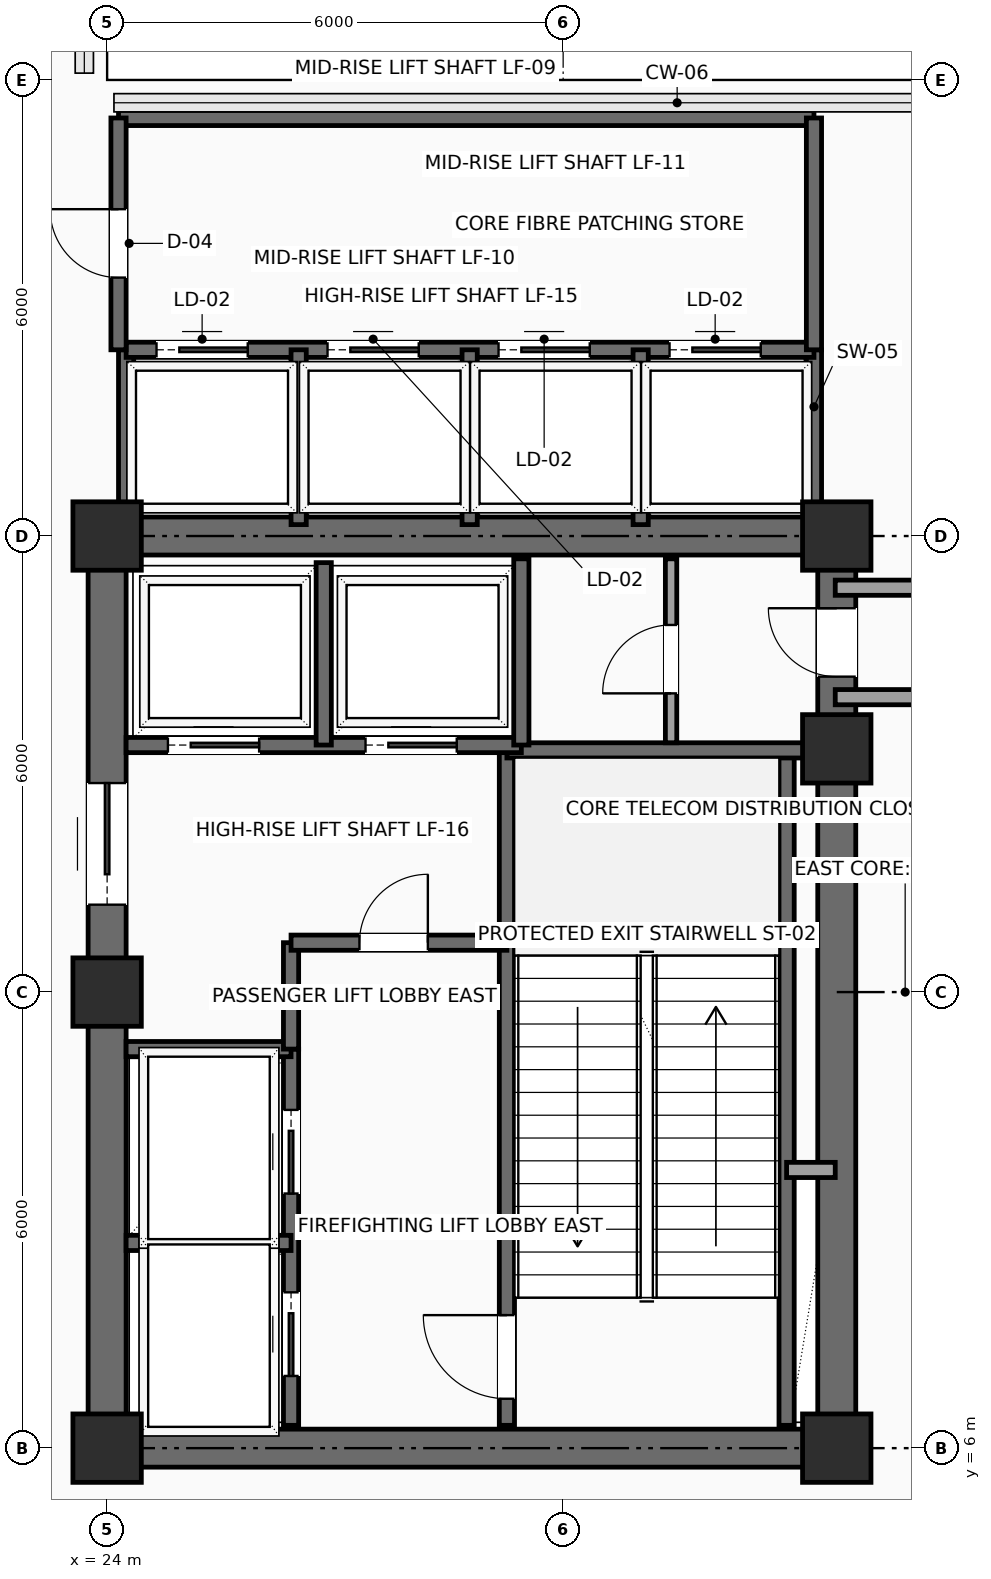
"""IFC4 building model, lengths in metres.
Left out: names, types, materials, properties, quantities, classifications, styles, units other than length and angle.
Written with IfcOpenShell. Run it as: python <this file> out.ifc"""

import sys

from ifc_helpers import new_model, si_unit, direction, frame, frame_2d, origin, origin_2d, place, context, subcontext, project, spatial, rectangle, extrude, element, fill, save


model = new_model("IFC4")
c1 = context("Model", 3, precision=1e-05, world=origin(), true_north=direction((0.0, 1.0)))
c2 = subcontext(c1, "Body", "Model", "MODEL_VIEW")
j1 = project(units=[si_unit("LENGTHUNIT", "METRE"), si_unit("PLANEANGLEUNIT", "RADIAN")], contexts=[c1])
p1 = place(None, origin())
s1 = spatial("IfcSite", under=j1, at=p1, CompositionType="ELEMENT")
p2 = place(p1, origin())
s2 = spatial("IfcBuilding", under=s1, at=p2, CompositionType="ELEMENT")
p3 = place(p2, frame((0.0, 0.0, 199.2)))
s3 = spatial("IfcBuildingStorey", under=s2, at=p3, CompositionType="ELEMENT", Elevation=199.2)
for number, where, z_axis, x_axis in (
    (1, (24.0, 6.0, 0.0), (0.0, 0.0, 1.0), (1.0, 0.0, 0.0)),
    (2, (24.0, 12.0, 0.0), (0.0, 0.0, 1.0), (1.0, 0.0, 0.0)),
    (3, (24.0, 18.0, 0.0), (0.0, 0.0, 1.0), (1.0, 0.0, 0.0)),
    (4, (33.6, 6.0, 0.0), (0.0, 0.0, 1.0), (1.0, 0.0, 0.0)),
    (5, (33.6, 15.2, 0.0), (0.0, 0.0, 1.0), (1.0, 0.0, 0.0)),
    (6, (33.6, 18.0, 0.0), (0.0, 0.0, 1.0), (1.0, 0.0, 0.0)),
):
    element("IfcColumn", number, at=place(p3, frame(where, z_axis=z_axis, x_axis=x_axis)), inside=s3, PredefinedType="COLUMN", context=c2, shape_type="SweptSolid", body=[
        extrude(rectangle(XDim=0.9, YDim=0.9, at=origin_2d()), origin(), (0.0, 0.0, 1.0), 4.8),
    ])
for number, where, z_axis, x_axis in (
    (7, (24.0, 6.0, 0.0), (0.0, 0.0, 1.0), (1.0, 0.0, 0.0)),
    (8, (24.0, 18.0, 0.0), (0.0, 0.0, 1.0), (1.0, 0.0, 0.0)),
):
    element("IfcWall", number, at=place(p3, frame(where, z_axis=z_axis, x_axis=x_axis)), inside=s3, PredefinedType="SHEAR", context=c2, shape_type="SweptSolid", body=[
        extrude(rectangle(XDim=9.6, YDim=0.5, at=frame_2d((4.8, 0.0))), origin(), (0.0, 0.0, 1.0), 4.5),
    ])
p4 = place(p3, frame((24.0, 6.0, 0.0), z_axis=(0.0, 0.0, 1.0), x_axis=(0.0, 1.0, 0.0)))
e9 = element("IfcWall", 9, at=p4, inside=s3, PredefinedType="SHEAR", context=c2, shape_type="SweptSolid", body=[
    extrude(rectangle(XDim=12.0, YDim=0.5, at=frame_2d((6.0, 0.0))), origin(), (0.0, 0.0, 1.0), 4.5),
])
p5 = place(p4, frame((7.15, 0.0, 0.0)))
e10 = element("IfcOpeningElement", 10, at=p5, cuts=e9, PredefinedType="OPENING", context=c2, shape_type="SweptSolid", body=[
    extrude(rectangle(XDim=1.6, YDim=2.3, at=frame_2d((0.8, 1.15))), frame((0.0, 0.26, 0.0), z_axis=(0.0, -1.0, 0.0), x_axis=(1.0, 0.0, 0.0)), (0.0, 0.0, 1.0), 0.52),
])
p6 = place(p3, frame((33.6, 6.0, 0.0), z_axis=(0.0, 0.0, 1.0), x_axis=(0.0, 1.0, 0.0)))
e11 = element("IfcWall", 11, at=p6, inside=s3, PredefinedType="SHEAR", context=c2, shape_type="SweptSolid", body=[
    extrude(rectangle(XDim=12.0, YDim=0.5, at=frame_2d((6.0, 0.0))), origin(), (0.0, 0.0, 1.0), 4.5),
])
p7 = place(p6, frame((10.15, 0.0, 0.0)))
e12 = element("IfcOpeningElement", 12, at=p7, cuts=e11, PredefinedType="OPENING", context=c2, shape_type="SweptSolid", body=[
    extrude(rectangle(XDim=0.9, YDim=2.15, at=frame_2d((0.45, 1.075))), frame((0.0, 0.26, 0.0), z_axis=(0.0, -1.0, 0.0), x_axis=(1.0, 0.0, 0.0)), (0.0, 0.0, 1.0), 0.52),
])
p8 = place(p3, frame((29.26, 6.3, 0.0), z_axis=(0.0, 0.0, 1.0), x_axis=(0.0, 1.0, 0.0)))
e13 = element("IfcWall", 13, at=p8, inside=s3, PredefinedType="SHEAR", context=c2, shape_type="SweptSolid", body=[
    extrude(rectangle(XDim=8.88, YDim=0.2, at=frame_2d((4.44, 0.0))), origin(), (0.0, 0.0, 1.0), 4.5),
])
p9 = place(p8, frame((0.35, 0.0, 0.0)))
e14 = element("IfcOpeningElement", 14, at=p9, cuts=e13, PredefinedType="OPENING", context=c2, shape_type="SweptSolid", body=[
    extrude(rectangle(XDim=1.1, YDim=2.2, at=frame_2d((0.55, 1.1))), frame((0.0, 0.11, 0.0), z_axis=(0.0, -1.0, 0.0), x_axis=(1.0, 0.0, 0.0)), (0.0, 0.0, 1.0), 0.22),
])
p10 = place(p3, frame((32.94, 6.3, 0.0), z_axis=(0.0, 0.0, 1.0), x_axis=(0.0, 1.0, 0.0)))
e15 = element("IfcWall", 15, at=p10, inside=s3, PredefinedType="SHEAR", context=c2, shape_type="SweptSolid", body=[
    extrude(rectangle(XDim=8.88, YDim=0.2, at=frame_2d((4.44, 0.0))), origin(), (0.0, 0.0, 1.0), 4.5),
])
p11 = place(p3, frame((29.26, 15.18, 0.0), z_axis=(0.0, 0.0, 1.0), x_axis=(1.0, 0.0, 0.0)))
e16 = element("IfcWall", 16, at=p11, inside=s3, PredefinedType="SHEAR", context=c2, shape_type="SweptSolid", body=[
    extrude(rectangle(XDim=4.04, YDim=0.2, at=frame_2d((2.02, 0.0))), origin(), (0.0, 0.0, 1.0), 4.5),
])
p12 = place(p3, frame((26.42, 6.3, 0.0), z_axis=(0.0, 0.0, 1.0), x_axis=(0.0, 1.0, 0.0)))
e17 = element("IfcWall", 17, at=p12, inside=s3, PredefinedType="SHEAR", context=c2, shape_type="SweptSolid", body=[
    extrude(rectangle(XDim=4.95, YDim=0.2, at=frame_2d((2.475, 0.0))), origin(), (0.0, 0.0, 1.0), 4.5),
])
p13 = place(p12, frame((0.65, 0.0, 0.0)))
e18 = element("IfcOpeningElement", 18, at=p13, cuts=e17, PredefinedType="OPENING", context=c2, shape_type="SweptSolid", body=[
    extrude(rectangle(XDim=1.1, YDim=2.2, at=frame_2d((0.55, 1.1))), frame((0.0, 0.11, 0.0), z_axis=(0.0, -1.0, 0.0), x_axis=(1.0, 0.0, 0.0)), (0.0, 0.0, 1.0), 0.22),
])
p14 = place(p12, frame((3.05, 0.0, 0.0)))
e19 = element("IfcOpeningElement", 19, at=p14, cuts=e17, PredefinedType="OPENING", context=c2, shape_type="SweptSolid", body=[
    extrude(rectangle(XDim=1.1, YDim=2.2, at=frame_2d((0.55, 1.1))), frame((0.0, 0.11, 0.0), z_axis=(0.0, -1.0, 0.0), x_axis=(1.0, 0.0, 0.0)), (0.0, 0.0, 1.0), 0.22),
])
for number, where, z_axis, x_axis in (
    (20, (24.25, 8.7, 0.0), (0.0, 0.0, 1.0), (1.0, 0.0, 0.0)),
    (21, (24.25, 11.25, 0.0), (0.0, 0.0, 1.0), (1.0, 0.0, 0.0)),
):
    element("IfcWall", number, at=place(p3, frame(where, z_axis=z_axis, x_axis=x_axis)), inside=s3, PredefinedType="SHEAR", context=c2, shape_type="SweptSolid", body=[
        extrude(rectangle(XDim=2.17, YDim=0.2, at=frame_2d((1.085, 0.0))), origin(), (0.0, 0.0, 1.0), 4.5),
    ])
p15 = place(p3, frame((26.42, 11.25, 0.0), z_axis=(0.0, 0.0, 1.0), x_axis=(0.0, 1.0, 0.0)))
e22 = element("IfcWall", 22, at=p15, inside=s3, PredefinedType="SHEAR", context=c2, shape_type="SweptSolid", body=[
    extrude(rectangle(XDim=1.4, YDim=0.2, at=frame_2d((0.7, 0.0))), origin(), (0.0, 0.0, 1.0), 4.5),
])
p16 = place(p3, frame((26.42, 12.65, 0.0), z_axis=(0.0, 0.0, 1.0), x_axis=(1.0, 0.0, 0.0)))
e23 = element("IfcWall", 23, at=p16, inside=s3, PredefinedType="SHEAR", context=c2, shape_type="SweptSolid", body=[
    extrude(rectangle(XDim=2.84, YDim=0.2, at=frame_2d((1.42, 0.0))), origin(), (0.0, 0.0, 1.0), 4.5),
])
p17 = place(p16, frame((0.9, 0.0, 0.0)))
e24 = element("IfcOpeningElement", 24, at=p17, cuts=e23, PredefinedType="OPENING", context=c2, shape_type="SweptSolid", body=[
    extrude(rectangle(XDim=0.9, YDim=2.15, at=frame_2d((0.45, 1.075))), frame((0.0, 0.11, 0.0), z_axis=(0.0, -1.0, 0.0), x_axis=(1.0, 0.0, 0.0)), (0.0, 0.0, 1.0), 0.22),
])
p18 = place(p3, frame((32.94, 9.66, 0.0), z_axis=(0.0, 0.0, 1.0), x_axis=(1.0, 0.0, 0.0)))
e25 = element("IfcWall", 25, at=p18, inside=s3, PredefinedType="SOLIDWALL", context=c2, shape_type="SweptSolid", body=[
    extrude(rectangle(XDim=0.64, YDim=0.2, at=frame_2d((0.32, 0.0))), origin(), (0.0, 0.0, 1.0), 4.5),
])
p19 = place(p3, frame((24.25, 15.25, 0.0), z_axis=(0.0, 0.0, 1.0), x_axis=(1.0, 0.0, 0.0)))
e26 = element("IfcWall", 26, at=p19, inside=s3, PredefinedType="SHEAR", context=c2, shape_type="SweptSolid", body=[
    extrude(rectangle(XDim=5.2, YDim=0.2, at=frame_2d((2.6, 0.0))), origin(), (0.0, 0.0, 1.0), 4.5),
])
p20 = place(p19, frame((0.55, 0.0, 0.0)))
e27 = element("IfcOpeningElement", 27, at=p20, cuts=e26, PredefinedType="OPENING", context=c2, shape_type="SweptSolid", body=[
    extrude(rectangle(XDim=1.2, YDim=2.2, at=frame_2d((0.6, 1.1))), frame((0.0, 0.11, 0.0), z_axis=(0.0, -1.0, 0.0), x_axis=(1.0, 0.0, 0.0)), (0.0, 0.0, 1.0), 0.22),
])
p21 = place(p19, frame((3.15, 0.0, 0.0)))
e28 = element("IfcOpeningElement", 28, at=p21, cuts=e26, PredefinedType="OPENING", context=c2, shape_type="SweptSolid", body=[
    extrude(rectangle(XDim=1.2, YDim=2.2, at=frame_2d((0.6, 1.1))), frame((0.0, 0.11, 0.0), z_axis=(0.0, -1.0, 0.0), x_axis=(1.0, 0.0, 0.0)), (0.0, 0.0, 1.0), 0.22),
])
p22 = place(p3, frame((26.85, 15.25, 0.0), z_axis=(0.0, 0.0, 1.0), x_axis=(0.0, 1.0, 0.0)))
e29 = element("IfcWall", 29, at=p22, inside=s3, PredefinedType="SHEAR", context=c2, shape_type="SweptSolid", body=[
    extrude(rectangle(XDim=2.4, YDim=0.2, at=frame_2d((1.2, 0.0))), origin(), (0.0, 0.0, 1.0), 4.5),
])
p23 = place(p3, frame((29.45, 15.25, 0.0), z_axis=(0.0, 0.0, 1.0), x_axis=(0.0, 1.0, 0.0)))
e30 = element("IfcWall", 30, at=p23, inside=s3, PredefinedType="SHEAR", context=c2, shape_type="SweptSolid", body=[
    extrude(rectangle(XDim=2.45, YDim=0.2, at=frame_2d((1.225, 0.0))), origin(), (0.0, 0.0, 1.0), 4.5),
])
p24 = place(p3, frame((31.42, 15.28, 0.0), z_axis=(0.0, 0.0, 1.0), x_axis=(0.0, 1.0, 0.0)))
e31 = element("IfcWall", 31, at=p24, inside=s3, PredefinedType="PARTITIONING", context=c2, shape_type="SweptSolid", body=[
    extrude(rectangle(XDim=2.42, YDim=0.15, at=frame_2d((1.21, 0.0))), origin(), (0.0, 0.0, 1.0), 4.5),
])
p25 = place(p24, frame((0.65, 0.0, 0.0)))
e32 = element("IfcOpeningElement", 32, at=p25, cuts=e31, PredefinedType="OPENING", context=c2, shape_type="SweptSolid", body=[
    extrude(rectangle(XDim=0.9, YDim=2.15, at=frame_2d((0.45, 1.075))), frame((0.0, 0.085, 0.0), z_axis=(0.0, -1.0, 0.0), x_axis=(1.0, 0.0, 0.0)), (0.0, 0.0, 1.0), 0.17),
])
for number, where, z_axis, x_axis in (
    (33, (33.3, 18.1, 0.0), (0.0, 0.0, 1.0), (0.0, 1.0, 0.0)),
    (34, (24.25, 18.1, 0.0), (0.0, 0.0, 1.0), (0.0, 1.0, 0.0)),
):
    element("IfcWall", number, at=place(p3, frame(where, z_axis=z_axis, x_axis=x_axis)), inside=s3, PredefinedType="SHEAR", context=c2, shape_type="SweptSolid", body=[
        extrude(rectangle(XDim=2.35, YDim=0.2, at=frame_2d((1.175, 0.0))), origin(), (0.0, 0.0, 1.0), 4.5),
    ])
p26 = place(p3, frame((24.25, 20.45, 0.0), z_axis=(0.0, 0.0, 1.0), x_axis=(1.0, 0.0, 0.0)))
e35 = element("IfcWall", 35, at=p26, inside=s3, PredefinedType="SHEAR", context=c2, shape_type="SweptSolid", body=[
    extrude(rectangle(XDim=9.05, YDim=0.2, at=frame_2d((4.525, 0.0))), origin(), (0.0, 0.0, 1.0), 4.5),
])
p27 = place(p26, frame((0.4, 0.0, 0.0)))
e36 = element("IfcOpeningElement", 36, at=p27, cuts=e35, PredefinedType="OPENING", context=c2, shape_type="SweptSolid", body=[
    extrude(rectangle(XDim=1.2, YDim=2.2, at=frame_2d((0.6, 1.1))), frame((0.0, 0.11, 0.0), z_axis=(0.0, -1.0, 0.0), x_axis=(1.0, 0.0, 0.0)), (0.0, 0.0, 1.0), 0.22),
])
p28 = place(p26, frame((2.65, 0.0, 0.0)))
e37 = element("IfcOpeningElement", 37, at=p28, cuts=e35, PredefinedType="OPENING", context=c2, shape_type="SweptSolid", body=[
    extrude(rectangle(XDim=1.2, YDim=2.2, at=frame_2d((0.6, 1.1))), frame((0.0, 0.11, 0.0), z_axis=(0.0, -1.0, 0.0), x_axis=(1.0, 0.0, 0.0)), (0.0, 0.0, 1.0), 0.22),
])
p29 = place(p26, frame((4.9, 0.0, 0.0)))
e38 = element("IfcOpeningElement", 38, at=p29, cuts=e35, PredefinedType="OPENING", context=c2, shape_type="SweptSolid", body=[
    extrude(rectangle(XDim=1.2, YDim=2.2, at=frame_2d((0.6, 1.1))), frame((0.0, 0.11, 0.0), z_axis=(0.0, -1.0, 0.0), x_axis=(1.0, 0.0, 0.0)), (0.0, 0.0, 1.0), 0.22),
])
p30 = place(p26, frame((7.15, 0.0, 0.0)))
e39 = element("IfcOpeningElement", 39, at=p30, cuts=e35, PredefinedType="OPENING", context=c2, shape_type="SweptSolid", body=[
    extrude(rectangle(XDim=1.2, YDim=2.2, at=frame_2d((0.6, 1.1))), frame((0.0, 0.11, 0.0), z_axis=(0.0, -1.0, 0.0), x_axis=(1.0, 0.0, 0.0)), (0.0, 0.0, 1.0), 0.22),
])
for number, where, z_axis, x_axis in (
    (40, (26.52, 18.15, 0.0), (0.0, 0.0, 1.0), (0.0, 1.0, 0.0)),
    (41, (28.77, 18.15, 0.0), (0.0, 0.0, 1.0), (0.0, 1.0, 0.0)),
    (42, (31.02, 18.15, 0.0), (0.0, 0.0, 1.0), (0.0, 1.0, 0.0)),
):
    element("IfcWall", number, at=place(p3, frame(where, z_axis=z_axis, x_axis=x_axis)), inside=s3, PredefinedType="SHEAR", context=c2, shape_type="SweptSolid", body=[
        extrude(rectangle(XDim=2.3, YDim=0.2, at=frame_2d((1.15, 0.0))), origin(), (0.0, 0.0, 1.0), 4.5),
    ])
p31 = place(p3, frame((24.15, 23.5, 0.0), z_axis=(0.0, 0.0, 1.0), x_axis=(1.0, 0.0, 0.0)))
e43 = element("IfcWall", 43, at=p31, inside=s3, PredefinedType="SHEAR", context=c2, shape_type="SweptSolid", body=[
    extrude(rectangle(XDim=9.15, YDim=0.2, at=frame_2d((4.575, 0.0))), origin(), (0.0, 0.0, 1.0), 4.5),
])
p32 = place(p3, frame((33.3, 20.45, 0.0), z_axis=(0.0, 0.0, 1.0), x_axis=(0.0, 1.0, 0.0)))
e44 = element("IfcWall", 44, at=p32, inside=s3, PredefinedType="SHEAR", context=c2, shape_type="SweptSolid", body=[
    extrude(rectangle(XDim=3.05, YDim=0.2, at=frame_2d((1.525, 0.0))), origin(), (0.0, 0.0, 1.0), 4.5),
])
p33 = place(p3, frame((24.15, 20.45, 0.0), z_axis=(0.0, 0.0, 1.0), x_axis=(0.0, 1.0, 0.0)))
e45 = element("IfcWall", 45, at=p33, inside=s3, PredefinedType="SHEAR", context=c2, shape_type="SweptSolid", body=[
    extrude(rectangle(XDim=3.05, YDim=0.2, at=frame_2d((1.525, 0.0))), origin(), (0.0, 0.0, 1.0), 4.5),
])
p34 = place(p33, frame((0.95, 0.0, 0.0)))
e46 = element("IfcOpeningElement", 46, at=p34, cuts=e45, PredefinedType="OPENING", context=c2, shape_type="SweptSolid", body=[
    extrude(rectangle(XDim=0.9, YDim=2.15, at=frame_2d((0.45, 1.075))), frame((0.0, 0.11, 0.0), z_axis=(0.0, -1.0, 0.0), x_axis=(1.0, 0.0, 0.0)), (0.0, 0.0, 1.0), 0.22),
])
for number, where, z_axis, x_axis in (
    (47, (36.15, 15.88, 0.0), (0.0, 0.0, 1.0), (-1.0, 0.0, 0.0)),
    (48, (33.58, 17.32, 0.0), (0.0, 0.0, 1.0), (1.0, 0.0, 0.0)),
):
    element("IfcWall", number, at=place(p3, frame(where, z_axis=z_axis, x_axis=x_axis)), inside=s3, PredefinedType="SOLIDWALL", context=c2, shape_type="SweptSolid", body=[
        extrude(rectangle(XDim=2.57, YDim=0.2, at=frame_2d((1.285, 0.0))), origin(), (0.0, 0.0, 1.0), 4.5),
    ])
p35 = place(p5, origin())
e49 = element("IfcDoor", 49, at=p35, inside=s3, OperationType="DOUBLE_DOOR_SLIDING", PredefinedType="DOOR", context=c2, shape_type="SweptSolid", body=[
    extrude(rectangle(XDim=1.6, YDim=2.3, at=frame_2d((0.8, 1.15))), frame((0.0, 0.025, 0.0), z_axis=(0.0, -1.0, 0.0), x_axis=(1.0, 0.0, 0.0)), (0.0, 0.0, 1.0), 0.05),
])
fill(e10, e49)
p36 = place(p7, origin())
e50 = element("IfcDoor", 50, at=p36, inside=s3, OperationType="SINGLE_SWING_RIGHT", PredefinedType="DOOR", context=c2, shape_type="SweptSolid", body=[
    extrude(rectangle(XDim=0.9, YDim=2.15, at=frame_2d((0.45, 1.075))), frame((0.0, 0.025, 0.0), z_axis=(0.0, -1.0, 0.0), x_axis=(1.0, 0.0, 0.0)), (0.0, 0.0, 1.0), 0.05),
])
fill(e12, e50)
p37 = place(p9, origin())
e51 = element("IfcDoor", 51, at=p37, inside=s3, OperationType="SINGLE_SWING_RIGHT", PredefinedType="DOOR", context=c2, shape_type="SweptSolid", body=[
    extrude(rectangle(XDim=1.1, YDim=2.2, at=frame_2d((0.55, 1.1))), frame((0.0, 0.025, 0.0), z_axis=(0.0, -1.0, 0.0), x_axis=(1.0, 0.0, 0.0)), (0.0, 0.0, 1.0), 0.05),
])
fill(e14, e51)
p38 = place(p13, origin())
e52 = element("IfcDoor", 52, at=p38, inside=s3, OperationType="SLIDING_TO_LEFT", PredefinedType="DOOR", context=c2, shape_type="SweptSolid", body=[
    extrude(rectangle(XDim=1.1, YDim=2.2, at=frame_2d((0.55, 1.1))), frame((0.0, 0.025, 0.0), z_axis=(0.0, -1.0, 0.0), x_axis=(1.0, 0.0, 0.0)), (0.0, 0.0, 1.0), 0.05),
])
fill(e18, e52)
p39 = place(p14, origin())
e53 = element("IfcDoor", 53, at=p39, inside=s3, OperationType="SLIDING_TO_LEFT", PredefinedType="DOOR", context=c2, shape_type="SweptSolid", body=[
    extrude(rectangle(XDim=1.1, YDim=2.2, at=frame_2d((0.55, 1.1))), frame((0.0, 0.025, 0.0), z_axis=(0.0, -1.0, 0.0), x_axis=(1.0, 0.0, 0.0)), (0.0, 0.0, 1.0), 0.05),
])
fill(e19, e53)
p40 = place(p17, origin())
e54 = element("IfcDoor", 54, at=p40, inside=s3, OperationType="SINGLE_SWING_RIGHT", PredefinedType="DOOR", context=c2, shape_type="SweptSolid", body=[
    extrude(rectangle(XDim=0.9, YDim=2.15, at=frame_2d((0.45, 1.075))), frame((0.0, 0.025, 0.0), z_axis=(0.0, -1.0, 0.0), x_axis=(1.0, 0.0, 0.0)), (0.0, 0.0, 1.0), 0.05),
])
fill(e24, e54)
p41 = place(p20, origin())
e55 = element("IfcDoor", 55, at=p41, inside=s3, OperationType="SLIDING_TO_RIGHT", PredefinedType="DOOR", context=c2, shape_type="SweptSolid", body=[
    extrude(rectangle(XDim=1.2, YDim=2.2, at=frame_2d((0.6, 1.1))), frame((0.0, 0.025, 0.0), z_axis=(0.0, -1.0, 0.0), x_axis=(1.0, 0.0, 0.0)), (0.0, 0.0, 1.0), 0.05),
])
fill(e27, e55)
p42 = place(p21, origin())
e56 = element("IfcDoor", 56, at=p42, inside=s3, OperationType="SLIDING_TO_RIGHT", PredefinedType="DOOR", context=c2, shape_type="SweptSolid", body=[
    extrude(rectangle(XDim=1.2, YDim=2.2, at=frame_2d((0.6, 1.1))), frame((0.0, 0.025, 0.0), z_axis=(0.0, -1.0, 0.0), x_axis=(1.0, 0.0, 0.0)), (0.0, 0.0, 1.0), 0.05),
])
fill(e28, e56)
p43 = place(p25, origin())
e57 = element("IfcDoor", 57, at=p43, inside=s3, OperationType="SINGLE_SWING_LEFT", PredefinedType="DOOR", context=c2, shape_type="SweptSolid", body=[
    extrude(rectangle(XDim=0.9, YDim=2.15, at=frame_2d((0.45, 1.075))), frame((0.0, 0.025, 0.0), z_axis=(0.0, -1.0, 0.0), x_axis=(1.0, 0.0, 0.0)), (0.0, 0.0, 1.0), 0.05),
])
fill(e32, e57)
p44 = place(p27, origin())
e58 = element("IfcDoor", 58, at=p44, inside=s3, OperationType="SLIDING_TO_RIGHT", PredefinedType="DOOR", context=c2, shape_type="SweptSolid", body=[
    extrude(rectangle(XDim=1.2, YDim=2.2, at=frame_2d((0.6, 1.1))), frame((0.0, 0.025, 0.0), z_axis=(0.0, -1.0, 0.0), x_axis=(1.0, 0.0, 0.0)), (0.0, 0.0, 1.0), 0.05),
])
fill(e36, e58)
p45 = place(p28, origin())
e59 = element("IfcDoor", 59, at=p45, inside=s3, OperationType="SLIDING_TO_RIGHT", PredefinedType="DOOR", context=c2, shape_type="SweptSolid", body=[
    extrude(rectangle(XDim=1.2, YDim=2.2, at=frame_2d((0.6, 1.1))), frame((0.0, 0.025, 0.0), z_axis=(0.0, -1.0, 0.0), x_axis=(1.0, 0.0, 0.0)), (0.0, 0.0, 1.0), 0.05),
])
fill(e37, e59)
p46 = place(p29, origin())
e60 = element("IfcDoor", 60, at=p46, inside=s3, OperationType="SLIDING_TO_RIGHT", PredefinedType="DOOR", context=c2, shape_type="SweptSolid", body=[
    extrude(rectangle(XDim=1.2, YDim=2.2, at=frame_2d((0.6, 1.1))), frame((0.0, 0.025, 0.0), z_axis=(0.0, -1.0, 0.0), x_axis=(1.0, 0.0, 0.0)), (0.0, 0.0, 1.0), 0.05),
])
fill(e38, e60)
p47 = place(p30, origin())
e61 = element("IfcDoor", 61, at=p47, inside=s3, OperationType="SLIDING_TO_RIGHT", PredefinedType="DOOR", context=c2, shape_type="SweptSolid", body=[
    extrude(rectangle(XDim=1.2, YDim=2.2, at=frame_2d((0.6, 1.1))), frame((0.0, 0.025, 0.0), z_axis=(0.0, -1.0, 0.0), x_axis=(1.0, 0.0, 0.0)), (0.0, 0.0, 1.0), 0.05),
])
fill(e39, e61)
p48 = place(p34, origin())
e62 = element("IfcDoor", 62, at=p48, inside=s3, OperationType="SINGLE_SWING_RIGHT", PredefinedType="DOOR", context=c2, shape_type="SweptSolid", body=[
    extrude(rectangle(XDim=0.9, YDim=2.15, at=frame_2d((0.45, 1.075))), frame((0.0, 0.025, 0.0), z_axis=(0.0, -1.0, 0.0), x_axis=(1.0, 0.0, 0.0)), (0.0, 0.0, 1.0), 0.05),
])
fill(e46, e62)
save(model, sys.argv[1])
